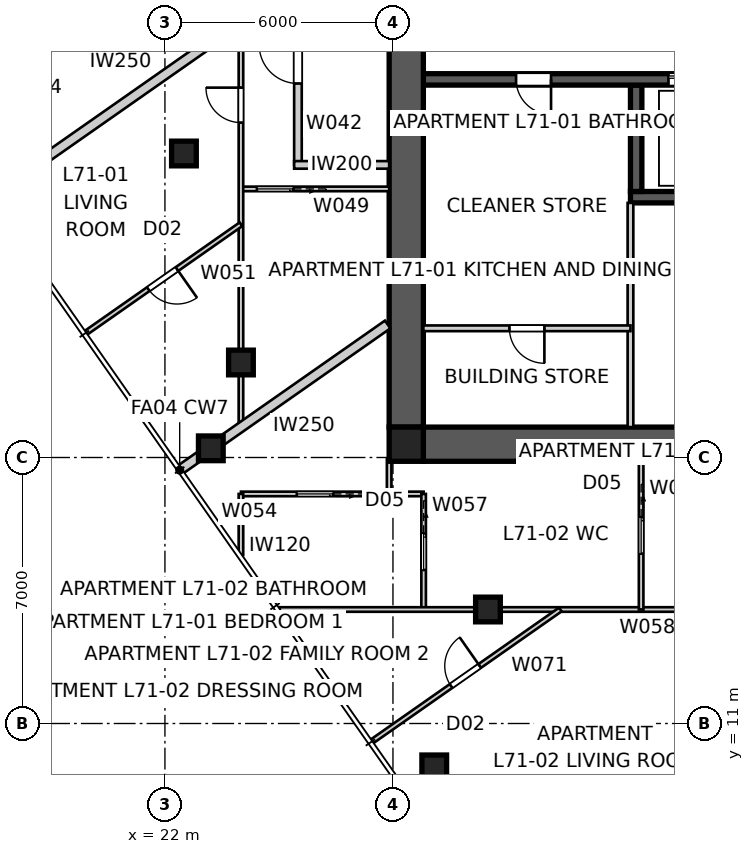
"""IFC4 building model, lengths in metres.
Left out: names, types, materials, properties, quantities, classifications, styles, units other than length and angle.
Written with IfcOpenShell. Run it as: python <this file> out.ifc"""

import sys

from ifc_helpers import new_model, si_unit, direction, frame, frame_2d, origin, origin_2d, place, context, subcontext, project, spatial, polyline, rectangle, outline, extrude, element, fill, save


model = new_model("IFC4")
c1 = context("Model", 3, precision=1e-05, world=origin(), true_north=direction((0.0, 1.0)))
c2 = subcontext(c1, "Body", "Model", "MODEL_VIEW")
j1 = project(units=[si_unit("LENGTHUNIT", "METRE"), si_unit("PLANEANGLEUNIT", "RADIAN")], contexts=[c1])
p1 = place(None, origin())
s1 = spatial("IfcSite", under=j1, at=p1, CompositionType="ELEMENT")
p2 = place(p1, origin())
s2 = spatial("IfcBuilding", under=s1, at=p2, CompositionType="ELEMENT")
p3 = place(p2, frame((0.0, 0.0, 257.4)))
s3 = spatial("IfcBuildingStorey", under=s2, at=p3, CompositionType="ELEMENT", Elevation=257.4)
p4 = place(p3, frame((51.2, 18.35, 0.0), z_axis=(0.0, 0.0, 1.0), x_axis=(-1.0, 0.0, 0.0)))
e1 = element("IfcWall", 1, at=p4, inside=s3, PredefinedType="SHEAR", context=c2, shape_type="SweptSolid", body=[
    extrude(outline(polyline([(0.0, -0.45), (22.4, -0.45), (22.4, -0.025), (22.85, -0.025), (22.85, 0.025), (22.4, 0.025), (22.4, 0.45), (0.0, 0.45), (0.0, 0.025), (-0.45, 0.025), (-0.45, -0.025), (0.0, -0.025), (0.0, -0.45)])), origin(), (0.0, 0.0, 1.0), 3.4),
])
p5 = place(p3, frame((28.35, 41.2, 0.0), z_axis=(0.0, 0.0, 1.0), x_axis=(0.0, -1.0, 0.0)))
e2 = element("IfcWall", 2, at=p5, inside=s3, PredefinedType="SHEAR", context=c2, shape_type="SweptSolid", body=[
    extrude(outline(polyline([(0.0, -0.45), (22.4, -0.45), (22.4, -0.025), (22.85, -0.025), (22.85, 0.025), (22.4, 0.025), (22.4, 0.45), (0.0, 0.45), (0.0, 0.025), (-0.45, 0.025), (-0.45, -0.025), (0.0, -0.025), (0.0, -0.45)])), origin(), (0.0, 0.0, 1.0), 3.4),
])
p6 = place(p5, frame((11.14, 0.0, 0.0)))
e3 = element("IfcOpeningElement", 3, at=p6, cuts=e2, PredefinedType="OPENING", context=c2, shape_type="SweptSolid", body=[
    extrude(rectangle(XDim=1.02, YDim=2.4, at=frame_2d((0.51, 1.2))), frame((0.0, 0.46, 0.0), z_axis=(0.0, -1.0, 0.0), x_axis=(1.0, 0.0, 0.0)), (0.0, 0.0, 1.0), 0.92),
])
p7 = place(p3, frame((51.2, 27.95, 0.0), z_axis=(0.0, 0.0, 1.0), x_axis=(-1.0, 0.0, 0.0)))
e4 = element("IfcWall", 4, at=p7, inside=s3, PredefinedType="SHEAR", context=c2, shape_type="SweptSolid", body=[
    extrude(rectangle(XDim=22.4, YDim=0.3, at=frame_2d((11.2, 0.0))), origin(), (0.0, 0.0, 1.0), 3.4),
])
p8 = place(p7, frame((19.04, 0.0, 0.0)))
e5 = element("IfcOpeningElement", 5, at=p8, cuts=e4, PredefinedType="OPENING", context=c2, shape_type="SweptSolid", body=[
    extrude(rectangle(XDim=0.92, YDim=2.1, at=frame_2d((0.46, 1.05))), frame((0.0, 0.16, 0.0), z_axis=(0.0, -1.0, 0.0), x_axis=(1.0, 0.0, 0.0)), (0.0, 0.0, 1.0), 0.32),
])
p9 = place(p7, frame((1.265, 0.0, 0.0)))
e6 = element("IfcOpeningElement", 6, at=p9, cuts=e4, PredefinedType="OPENING", context=c2, shape_type="SweptSolid", body=[
    extrude(rectangle(XDim=1.02, YDim=2.1, at=frame_2d((0.51, 1.05))), frame((0.0, 0.16, 0.0), z_axis=(0.0, -1.0, 0.0), x_axis=(1.0, 0.0, 0.0)), (0.0, 0.0, 1.0), 0.32),
])
p10 = place(p7, frame((4.015, 0.0, 0.0)))
e7 = element("IfcOpeningElement", 7, at=p10, cuts=e4, PredefinedType="OPENING", context=c2, shape_type="SweptSolid", body=[
    extrude(rectangle(XDim=0.92, YDim=2.1, at=frame_2d((0.46, 1.05))), frame((0.0, 0.16, 0.0), z_axis=(0.0, -1.0, 0.0), x_axis=(1.0, 0.0, 0.0)), (0.0, 0.0, 1.0), 0.32),
])
p11 = place(p7, frame((9.79, 0.0, 0.0)))
e8 = element("IfcOpeningElement", 8, at=p11, cuts=e4, PredefinedType="OPENING", context=c2, shape_type="SweptSolid", body=[
    extrude(rectangle(XDim=0.92, YDim=2.1, at=frame_2d((0.46, 1.05))), frame((0.0, 0.16, 0.0), z_axis=(0.0, -1.0, 0.0), x_axis=(1.0, 0.0, 0.0)), (0.0, 0.0, 1.0), 0.32),
])
p12 = place(p7, frame((6.115, 0.0, 0.0)))
e9 = element("IfcOpeningElement", 9, at=p12, cuts=e4, PredefinedType="OPENING", context=c2, shape_type="SweptSolid", body=[
    extrude(rectangle(XDim=0.92, YDim=2.1, at=frame_2d((0.46, 1.05))), frame((0.0, 0.16, 0.0), z_axis=(0.0, -1.0, 0.0), x_axis=(1.0, 0.0, 0.0)), (0.0, 0.0, 1.0), 0.32),
])
p13 = place(p7, frame((12.05, 0.0, 0.0)))
e10 = element("IfcOpeningElement", 10, at=p13, cuts=e4, PredefinedType="OPENING", context=c2, shape_type="SweptSolid", body=[
    extrude(rectangle(XDim=1.1, YDim=2.1, at=frame_2d((0.55, 1.05))), frame((0.0, 0.16, 0.0), z_axis=(0.0, -1.0, 0.0), x_axis=(1.0, 0.0, 0.0)), (0.0, 0.0, 1.0), 0.32),
])
p14 = place(p7, frame((14.85, 0.0, 0.0)))
e11 = element("IfcOpeningElement", 11, at=p14, cuts=e4, PredefinedType="OPENING", context=c2, shape_type="SweptSolid", body=[
    extrude(rectangle(XDim=1.1, YDim=2.1, at=frame_2d((0.55, 1.05))), frame((0.0, 0.16, 0.0), z_axis=(0.0, -1.0, 0.0), x_axis=(1.0, 0.0, 0.0)), (0.0, 0.0, 1.0), 0.32),
])
p15 = place(p3, frame((45.75, 24.85, 0.0), z_axis=(0.0, 0.0, 1.0), x_axis=(-1.0, 0.0, 0.0)))
e12 = element("IfcWall", 12, at=p15, inside=s3, PredefinedType="SHEAR", context=c2, shape_type="SweptSolid", body=[
    extrude(rectangle(XDim=11.5, YDim=0.3, at=frame_2d((5.75, 0.0))), origin(), (0.0, 0.0, 1.0), 3.4),
])
p16 = place(p3, frame((34.4, 27.8, 0.0), z_axis=(0.0, 0.0, 1.0), x_axis=(0.0, -1.0, 0.0)))
e13 = element("IfcWall", 13, at=p16, inside=s3, PredefinedType="SHEAR", context=c2, shape_type="SweptSolid", body=[
    extrude(rectangle(XDim=2.8, YDim=0.3, at=frame_2d((1.4, 0.0))), origin(), (0.0, 0.0, 1.0), 3.4),
])
p17 = place(p3, frame((28.35, 18.35, 0.0), z_axis=(0.0, 0.0, 1.0), x_axis=(1.0, 0.0, 0.0)))
e14 = element("IfcColumn", 14, at=p17, inside=s3, PredefinedType="COLUMN", context=c2, shape_type="SweptSolid", body=[
    extrude(rectangle(XDim=0.9, YDim=0.9, at=origin_2d()), origin(), (0.0, 0.0, 1.0), 3.4),
])
for number, where, z_axis, x_axis in (
    (15, (23.207, 18.242, 0.0), (0.0, 0.0, 1.0), (1.0, 0.0, 0.0)),
    (16, (29.086, 9.845, 0.0), (0.0, 0.0, 1.0), (1.0, 0.0, 0.0)),
    (17, (22.5, 26.0, 0.0), (0.0, 0.0, 1.0), (1.0, 0.0, 0.0)),
    (18, (24.0, 20.5, 0.0), (0.0, 0.0, 1.0), (1.0, 0.0, 0.0)),
    (19, (30.5, 14.0, 0.0), (0.0, 0.0, 1.0), (1.0, 0.0, 0.0)),
):
    element("IfcColumn", number, at=place(p3, frame(where, z_axis=z_axis, x_axis=x_axis)), inside=s3, PredefinedType="COLUMN", context=c2, shape_type="SweptSolid", body=[
        extrude(rectangle(XDim=0.65, YDim=0.65, at=origin_2d()), origin(), (0.0, 0.0, 1.0), 3.4),
    ])
p18 = place(p3, frame((25.5, 25.7, 0.0), z_axis=(0.0, 0.0, 1.0), x_axis=(0.0, 1.0, 0.0)))
e20 = element("IfcWall", 20, at=p18, inside=s3, PredefinedType="PARTITIONING", context=c2, shape_type="SweptSolid", body=[
    extrude(rectangle(XDim=8.6, YDim=0.2, at=frame_2d((4.3, 0.0))), origin(), (0.0, 0.0, 1.0), 3.25),
])
p19 = place(p18, frame((2.142, 0.0, 0.0)))
e21 = element("IfcOpeningElement", 21, at=p19, cuts=e20, PredefinedType="OPENING", context=c2, shape_type="SweptSolid", body=[
    extrude(rectangle(XDim=1.02, YDim=2.34, at=frame_2d((0.51, 1.17))), frame((0.0, 0.11, 0.0), z_axis=(0.0, -1.0, 0.0), x_axis=(1.0, 0.0, 0.0)), (0.0, 0.0, 1.0), 0.22),
])
p20 = place(p18, frame((6.037, 0.0, 0.0)))
e22 = element("IfcOpeningElement", 22, at=p20, cuts=e20, PredefinedType="OPENING", context=c2, shape_type="SweptSolid", body=[
    extrude(rectangle(XDim=1.02, YDim=2.34, at=frame_2d((0.51, 1.17))), frame((0.0, 0.11, 0.0), z_axis=(0.0, -1.0, 0.0), x_axis=(1.0, 0.0, 0.0)), (0.0, 0.0, 1.0), 0.22),
])
p21 = place(p3, frame((27.9, 25.7, 0.0), z_axis=(0.0, 0.0, 1.0), x_axis=(-1.0, 0.0, 0.0)))
e23 = element("IfcWall", 23, at=p21, inside=s3, PredefinedType="PARTITIONING", context=c2, shape_type="SweptSolid", body=[
    extrude(rectangle(XDim=2.5, YDim=0.2, at=frame_2d((1.25, 0.0))), origin(), (0.0, 0.0, 1.0), 3.25),
])
p22 = place(p3, frame((22.388, 17.668, 0.0), z_axis=(0.0, 0.0, 1.0), x_axis=(0.819161528122, 0.573562891796, 0.0)))
e24 = element("IfcWall", 24, at=p22, inside=s3, PredefinedType="PARTITIONING", context=c2, shape_type="SweptSolid", body=[
    extrude(rectangle(XDim=6.681, YDim=0.25, at=frame_2d((3.341, 0.0))), origin(), (0.0, 0.0, 1.0), 3.25),
])
p23 = place(p3, frame((17.369, 24.836, 0.0), z_axis=(0.0, 0.0, 1.0), x_axis=(0.81915902312, 0.573566469418, 0.0)))
e25 = element("IfcWall", 25, at=p23, inside=s3, PredefinedType="PARTITIONING", context=c2, shape_type="SweptSolid", body=[
    extrude(rectangle(XDim=9.756, YDim=0.25, at=frame_2d((4.878, 0.0))), origin(), (0.0, 0.0, 1.0), 3.25),
])
p24 = place(p3, frame((34.25, 18.8, 0.0), z_axis=(0.0, 0.0, 1.0), x_axis=(0.0, 1.0, 0.0)))
e26 = element("IfcWall", 26, at=p24, inside=s3, PredefinedType="SOLIDWALL", context=c2, shape_type="SweptSolid", body=[
    extrude(rectangle(XDim=5.9, YDim=0.15, at=frame_2d((2.95, 0.0))), origin(), (0.0, 0.0, 1.0), 3.25),
])
p25 = place(p3, frame((34.25, 21.4, 0.0), z_axis=(0.0, 0.0, 1.0), x_axis=(-1.0, 0.0, 0.0)))
e27 = element("IfcWall", 27, at=p25, inside=s3, PredefinedType="SOLIDWALL", context=c2, shape_type="SweptSolid", body=[
    extrude(rectangle(XDim=5.45, YDim=0.15, at=frame_2d((2.725, 0.0))), origin(), (0.0, 0.0, 1.0), 3.25),
])
p26 = place(p25, frame((2.265, 0.0, 0.0)))
e28 = element("IfcOpeningElement", 28, at=p26, cuts=e27, PredefinedType="OPENING", context=c2, shape_type="SweptSolid", body=[
    extrude(rectangle(XDim=0.92, YDim=2.1, at=frame_2d((0.46, 1.05))), frame((0.0, 0.085, 0.0), z_axis=(0.0, -1.0, 0.0), x_axis=(1.0, 0.0, 0.0)), (0.0, 0.0, 1.0), 0.17),
])
p27 = place(p3, frame((27.9, 25.068, 0.0), z_axis=(0.0, 0.0, 1.0), x_axis=(-1.0, 0.0, 0.0)))
e29 = element("IfcWall", 29, at=p27, inside=s3, PredefinedType="PARTITIONING", context=c2, shape_type="SweptSolid", body=[
    extrude(rectangle(XDim=3.9, YDim=0.12, at=frame_2d((1.95, 0.0))), origin(), (0.0, 0.0, 1.0), 3.25),
])
p28 = place(p27, frame((2.52, 0.0, 0.0)))
e30 = element("IfcOpeningElement", 30, at=p28, cuts=e29, PredefinedType="OPENING", context=c2, shape_type="SweptSolid", body=[
    extrude(rectangle(XDim=0.96, YDim=2.1, at=frame_2d((0.48, 1.05))), frame((0.0, 0.07, 0.0), z_axis=(0.0, -1.0, 0.0), x_axis=(1.0, 0.0, 0.0)), (0.0, 0.0, 1.0), 0.14),
])
p29 = place(p3, frame((24.0, 18.797, 0.0), z_axis=(0.0, 0.0, 1.0), x_axis=(0.0, 1.0, 0.0)))
e31 = element("IfcWall", 31, at=p29, inside=s3, PredefinedType="PARTITIONING", context=c2, shape_type="SweptSolid", body=[
    extrude(rectangle(XDim=26.198, YDim=0.12, at=frame_2d((13.099, 0.0))), origin(), (0.0, 0.0, 1.0), 2.55),
])
p30 = place(p29, frame((8.016, 0.0, 0.0)))
e32 = element("IfcOpeningElement", 32, at=p30, cuts=e31, PredefinedType="OPENING", context=c2, shape_type="SweptSolid", body=[
    extrude(rectangle(XDim=0.92, YDim=2.34, at=frame_2d((0.46, 1.17))), frame((0.0, 0.07, 0.0), z_axis=(0.0, -1.0, 0.0), x_axis=(1.0, 0.0, 0.0)), (0.0, 0.0, 1.0), 0.14),
])
p31 = place(p29, frame((16.292, 0.0, 0.0)))
e33 = element("IfcOpeningElement", 33, at=p31, cuts=e31, PredefinedType="OPENING", context=c2, shape_type="SweptSolid", body=[
    extrude(rectangle(XDim=0.92, YDim=2.34, at=frame_2d((0.46, 1.17))), frame((0.0, 0.07, 0.0), z_axis=(0.0, -1.0, 0.0), x_axis=(1.0, 0.0, 0.0)), (0.0, 0.0, 1.0), 0.14),
])
p32 = place(p3, frame((24.0, 24.138, 0.0), z_axis=(0.0, 0.0, 1.0), x_axis=(-0.819144584763, -0.57358708951, 0.0)))
e34 = element("IfcWall", 34, at=p32, inside=s3, PredefinedType="PARTITIONING", context=c2, shape_type="SweptSolid", body=[
    extrude(rectangle(XDim=4.991, YDim=0.12, at=frame_2d((2.496, 0.0))), origin(), (0.0, 0.0, 1.0), 3.25),
])
p33 = place(p32, frame((2.055, 0.0, 0.0)))
e35 = element("IfcOpeningElement", 35, at=p33, cuts=e34, PredefinedType="OPENING", context=c2, shape_type="SweptSolid", body=[
    extrude(rectangle(XDim=0.92, YDim=2.34, at=frame_2d((0.46, 1.17))), frame((0.0, 0.07, 0.0), z_axis=(0.0, -1.0, 0.0), x_axis=(1.0, 0.0, 0.0)), (0.0, 0.0, 1.0), 0.14),
])
p34 = place(p3, frame((28.807, 17.041, 0.0), z_axis=(0.0, 0.0, 1.0), x_axis=(-1.0, 0.0, 0.0)))
e36 = element("IfcWall", 36, at=p34, inside=s3, PredefinedType="PARTITIONING", context=c2, shape_type="SweptSolid", body=[
    extrude(rectangle(XDim=4.807, YDim=0.12, at=frame_2d((2.404, 0.0))), origin(), (0.0, 0.0, 1.0), 3.25),
])
p35 = place(p34, frame((2.377, 0.0, 0.0)))
e37 = element("IfcOpeningElement", 37, at=p35, cuts=e36, PredefinedType="OPENING", context=c2, shape_type="SweptSolid", body=[
    extrude(rectangle(XDim=0.96, YDim=2.1, at=frame_2d((0.48, 1.05))), frame((0.0, 0.07, 0.0), z_axis=(0.0, -1.0, 0.0), x_axis=(1.0, 0.0, 0.0)), (0.0, 0.0, 1.0), 0.14),
])
p36 = place(p3, frame((24.0, 17.041, 0.0), z_axis=(0.0, 0.0, 1.0), x_axis=(0.0, -1.0, 0.0)))
e38 = element("IfcWall", 38, at=p36, inside=s3, PredefinedType="PARTITIONING", context=c2, shape_type="SweptSolid", body=[
    extrude(rectangle(XDim=1.605, YDim=0.12, at=frame_2d((0.803, 0.0))), origin(), (0.0, 0.0, 1.0), 3.25),
])
p37 = place(p3, frame((27.9, 17.95, 0.0), z_axis=(0.0, 0.0, 1.0), x_axis=(0.0, -1.0, 0.0)))
e39 = element("IfcWall", 39, at=p37, inside=s3, PredefinedType="PARTITIONING", context=c2, shape_type="SweptSolid", body=[
    extrude(rectangle(XDim=0.909, YDim=0.12, at=frame_2d((0.454, 0.0))), origin(), (0.0, 0.0, 1.0), 3.25),
])
p38 = place(p3, frame((28.807, 17.041, 0.0), z_axis=(0.0, 0.0, 1.0), x_axis=(0.0, -1.0, 0.0)))
e40 = element("IfcWall", 40, at=p38, inside=s3, PredefinedType="PARTITIONING", context=c2, shape_type="SweptSolid", body=[
    extrude(rectangle(XDim=3.041, YDim=0.12, at=frame_2d((1.521, 0.0))), origin(), (0.0, 0.0, 1.0), 3.25),
])
p39 = place(p38, frame((1.041, 0.0, 0.0)))
e41 = element("IfcOpeningElement", 41, at=p39, cuts=e40, PredefinedType="OPENING", context=c2, shape_type="SweptSolid", body=[
    extrude(rectangle(XDim=0.96, YDim=2.1, at=frame_2d((0.48, 1.05))), frame((0.0, 0.07, 0.0), z_axis=(0.0, -1.0, 0.0), x_axis=(1.0, 0.0, 0.0)), (0.0, 0.0, 1.0), 0.14),
])
p40 = place(p3, frame((47.476, 14.0, 0.0), z_axis=(0.0, 0.0, 1.0), x_axis=(-1.0, 0.0, 0.0)))
e42 = element("IfcWall", 42, at=p40, inside=s3, PredefinedType="PARTITIONING", context=c2, shape_type="SweptSolid", body=[
    extrude(rectangle(XDim=22.471, YDim=0.12, at=frame_2d((11.235, 0.0))), origin(), (0.0, 0.0, 1.0), 2.55),
])
p41 = place(p40, frame((7.664, 0.0, 0.0)))
e43 = element("IfcOpeningElement", 43, at=p41, cuts=e42, PredefinedType="OPENING", context=c2, shape_type="SweptSolid", body=[
    extrude(rectangle(XDim=0.96, YDim=2.1, at=frame_2d((0.48, 1.05))), frame((0.0, 0.07, 0.0), z_axis=(0.0, -1.0, 0.0), x_axis=(1.0, 0.0, 0.0)), (0.0, 0.0, 1.0), 0.14),
])
p42 = place(p3, frame((34.53, 17.9, 0.0), z_axis=(0.0, 0.0, 1.0), x_axis=(0.0, -1.0, 0.0)))
e44 = element("IfcWall", 44, at=p42, inside=s3, PredefinedType="PARTITIONING", context=c2, shape_type="SweptSolid", body=[
    extrude(rectangle(XDim=3.9, YDim=0.12, at=frame_2d((1.95, 0.0))), origin(), (0.0, 0.0, 1.0), 3.25),
])
p43 = place(p42, frame((1.47, 0.0, 0.0)))
e45 = element("IfcOpeningElement", 45, at=p43, cuts=e44, PredefinedType="OPENING", context=c2, shape_type="SweptSolid", body=[
    extrude(rectangle(XDim=0.96, YDim=2.1, at=frame_2d((0.48, 1.05))), frame((0.0, 0.07, 0.0), z_axis=(0.0, -1.0, 0.0), x_axis=(1.0, 0.0, 0.0)), (0.0, 0.0, 1.0), 0.14),
])
p44 = place(p3, frame((41.528, 12.562, 0.0), z_axis=(0.0, 0.0, 1.0), x_axis=(-0.819146182185, -0.573584808212, 0.0)))
e46 = element("IfcWall", 46, at=p44, inside=s3, PredefinedType="PARTITIONING", context=c2, shape_type="SweptSolid", body=[
    extrude(rectangle(XDim=12.71, YDim=0.12, at=frame_2d((6.355, 0.0))), origin(), (0.0, 0.0, 1.0), 3.25),
])
p45 = place(p44, frame((8.077, 0.0, 0.0)))
e47 = element("IfcOpeningElement", 47, at=p45, cuts=e46, PredefinedType="OPENING", context=c2, shape_type="SweptSolid", body=[
    extrude(rectangle(XDim=0.92, YDim=2.34, at=frame_2d((0.46, 1.17))), frame((0.0, 0.07, 0.0), z_axis=(0.0, -1.0, 0.0), x_axis=(1.0, 0.0, 0.0)), (0.0, 0.0, 1.0), 0.14),
])
p46 = place(p44, frame((1.752, 0.0, 0.0)))
e48 = element("IfcOpeningElement", 48, at=p46, cuts=e46, PredefinedType="OPENING", context=c2, shape_type="SweptSolid", body=[
    extrude(rectangle(XDim=0.92, YDim=2.34, at=frame_2d((0.46, 1.17))), frame((0.0, 0.07, 0.0), z_axis=(0.0, -1.0, 0.0), x_axis=(1.0, 0.0, 0.0)), (0.0, 0.0, 1.0), 0.14),
])
p47 = place(p3, frame((27.44, 10.523, 0.0), z_axis=(0.0, 0.0, 1.0), x_axis=(0.81915432861, 0.573573173989, 0.0)))
e49 = element("IfcWall", 49, at=p47, inside=s3, PredefinedType="PARTITIONING", context=c2, shape_type="SweptSolid", body=[
    extrude(rectangle(XDim=6.061, YDim=0.12, at=frame_2d((3.031, 0.0))), origin(), (0.0, 0.0, 1.0), 3.25),
])
p48 = place(p47, frame((2.551, 0.0, 0.0)))
e50 = element("IfcOpeningElement", 50, at=p48, cuts=e49, PredefinedType="OPENING", context=c2, shape_type="SweptSolid", body=[
    extrude(rectangle(XDim=0.92, YDim=2.34, at=frame_2d((0.46, 1.17))), frame((0.0, 0.07, 0.0), z_axis=(0.0, -1.0, 0.0), x_axis=(1.0, 0.0, 0.0)), (0.0, 0.0, 1.0), 0.14),
])
p49 = place(p3, frame((20.731, 32.53, 0.0), z_axis=(0.0, 0.0, 1.0), x_axis=(-0.819153056029, -0.573574991434, 0.0)))
e51 = element("IfcWall", 51, at=p49, inside=s3, PredefinedType="PARTITIONING", context=c2, shape_type="SweptSolid", body=[
    extrude(rectangle(XDim=7.127, YDim=0.12, at=frame_2d((3.563, 0.0))), origin(), (0.0, 0.0, 1.0), 3.25),
])
p50 = place(p8, origin())
e52 = element("IfcDoor", 52, at=p50, inside=s3, OperationType="SINGLE_SWING_LEFT", PredefinedType="DOOR", context=c2, shape_type="SweptSolid", body=[
    extrude(rectangle(XDim=0.92, YDim=2.1, at=frame_2d((0.46, 1.05))), frame((0.0, 0.025, 0.0), z_axis=(0.0, -1.0, 0.0), x_axis=(1.0, 0.0, 0.0)), (0.0, 0.0, 1.0), 0.05),
])
fill(e5, e52)
p51 = place(p19, origin())
e53 = element("IfcDoor", 53, at=p51, inside=s3, OperationType="SINGLE_SWING_RIGHT", PredefinedType="DOOR", context=c2, shape_type="SweptSolid", body=[
    extrude(rectangle(XDim=1.02, YDim=2.34, at=frame_2d((0.51, 1.17))), frame((0.0, 0.025, 0.0), z_axis=(0.0, -1.0, 0.0), x_axis=(1.0, 0.0, 0.0)), (0.0, 0.0, 1.0), 0.05),
])
fill(e21, e53)
p52 = place(p26, origin())
e54 = element("IfcDoor", 54, at=p52, inside=s3, OperationType="SINGLE_SWING_LEFT", PredefinedType="DOOR", context=c2, shape_type="SweptSolid", body=[
    extrude(rectangle(XDim=0.92, YDim=2.1, at=frame_2d((0.46, 1.05))), frame((0.0, 0.025, 0.0), z_axis=(0.0, -1.0, 0.0), x_axis=(1.0, 0.0, 0.0)), (0.0, 0.0, 1.0), 0.05),
])
fill(e28, e54)
p53 = place(p30, origin())
e55 = element("IfcDoor", 55, at=p53, inside=s3, OperationType="SINGLE_SWING_RIGHT", PredefinedType="DOOR", context=c2, shape_type="SweptSolid", body=[
    extrude(rectangle(XDim=0.92, YDim=2.34, at=frame_2d((0.46, 1.17))), frame((0.0, 0.025, 0.0), z_axis=(0.0, -1.0, 0.0), x_axis=(1.0, 0.0, 0.0)), (0.0, 0.0, 1.0), 0.05),
])
fill(e32, e55)
p54 = place(p28, origin())
e56 = element("IfcDoor", 56, at=p54, inside=s3, OperationType="SLIDING_TO_LEFT", PredefinedType="DOOR", context=c2, shape_type="SweptSolid", body=[
    extrude(rectangle(XDim=0.96, YDim=2.1, at=frame_2d((0.48, 1.05))), frame((0.0, 0.025, 0.0), z_axis=(0.0, -1.0, 0.0), x_axis=(1.0, 0.0, 0.0)), (0.0, 0.0, 1.0), 0.05),
])
fill(e30, e56)
p55 = place(p33, origin())
e57 = element("IfcDoor", 57, at=p55, inside=s3, OperationType="SINGLE_SWING_LEFT", PredefinedType="DOOR", context=c2, shape_type="SweptSolid", body=[
    extrude(rectangle(XDim=0.92, YDim=2.34, at=frame_2d((0.46, 1.17))), frame((0.0, 0.025, 0.0), z_axis=(0.0, -1.0, 0.0), x_axis=(1.0, 0.0, 0.0)), (0.0, 0.0, 1.0), 0.05),
])
fill(e35, e57)
p56 = place(p43, origin())
e58 = element("IfcDoor", 58, at=p56, inside=s3, OperationType="SLIDING_TO_LEFT", PredefinedType="DOOR", context=c2, shape_type="SweptSolid", body=[
    extrude(rectangle(XDim=0.96, YDim=2.1, at=frame_2d((0.48, 1.05))), frame((0.0, 0.025, 0.0), z_axis=(0.0, -1.0, 0.0), x_axis=(1.0, 0.0, 0.0)), (0.0, 0.0, 1.0), 0.05),
])
fill(e45, e58)
p57 = place(p48, origin())
e59 = element("IfcDoor", 59, at=p57, inside=s3, OperationType="SINGLE_SWING_RIGHT", PredefinedType="DOOR", context=c2, shape_type="SweptSolid", body=[
    extrude(rectangle(XDim=0.92, YDim=2.34, at=frame_2d((0.46, 1.17))), frame((0.0, 0.025, 0.0), z_axis=(0.0, -1.0, 0.0), x_axis=(1.0, 0.0, 0.0)), (0.0, 0.0, 1.0), 0.05),
])
fill(e50, e59)
p58 = place(p39, origin())
e60 = element("IfcDoor", 60, at=p58, inside=s3, OperationType="SLIDING_TO_LEFT", PredefinedType="DOOR", context=c2, shape_type="SweptSolid", body=[
    extrude(rectangle(XDim=0.96, YDim=2.1, at=frame_2d((0.48, 1.05))), frame((0.0, 0.025, 0.0), z_axis=(0.0, -1.0, 0.0), x_axis=(1.0, 0.0, 0.0)), (0.0, 0.0, 1.0), 0.05),
])
fill(e41, e60)
p59 = place(p35, origin())
e61 = element("IfcDoor", 61, at=p59, inside=s3, OperationType="SLIDING_TO_LEFT", PredefinedType="DOOR", context=c2, shape_type="SweptSolid", body=[
    extrude(rectangle(XDim=0.96, YDim=2.1, at=frame_2d((0.48, 1.05))), frame((0.0, 0.025, 0.0), z_axis=(0.0, -1.0, 0.0), x_axis=(1.0, 0.0, 0.0)), (0.0, 0.0, 1.0), 0.05),
])
fill(e37, e61)
p60 = place(p14, origin())
e62 = element("IfcDoor", 62, at=p60, inside=s3, OperationType="SLIDING_TO_LEFT", PredefinedType="DOOR", context=c2, shape_type="SweptSolid", body=[
    extrude(rectangle(XDim=1.1, YDim=2.1, at=frame_2d((0.55, 1.05))), frame((0.0, 0.025, 0.0), z_axis=(0.0, -1.0, 0.0), x_axis=(1.0, 0.0, 0.0)), (0.0, 0.0, 1.0), 0.05),
])
fill(e11, e62)
save(model, sys.argv[1])
